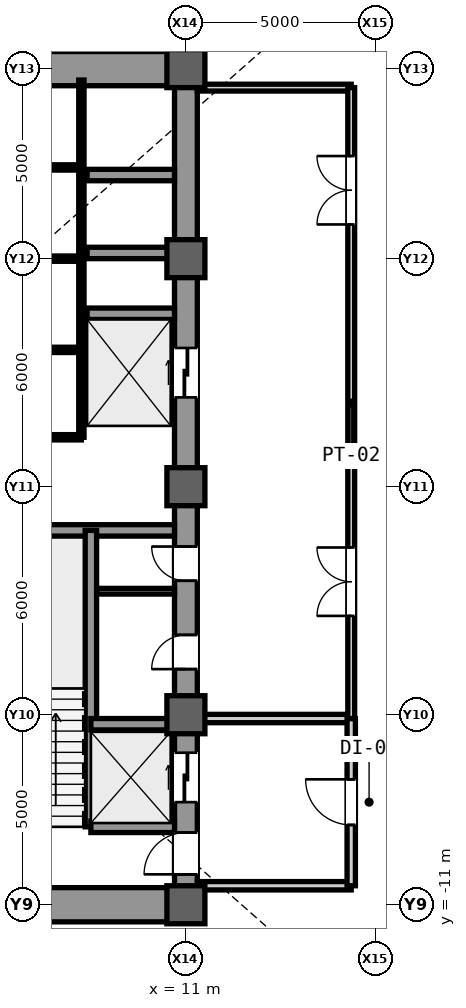
"""IFC4 building model, lengths in metres.
Left out: names, types, materials, properties, quantities, classifications, styles, units other than length and angle.
Written with IfcOpenShell. Run it as: python <this file> out.ifc"""

import sys

from ifc_helpers import new_model, si_unit, direction, frame, frame_2d, origin, origin_2d, place, context, subcontext, project, spatial, rectangle, extrude, source, transform, mapped, element, fill, save


model = new_model("IFC4")
c1 = context("Model", 3, precision=1e-05, world=origin(), true_north=direction((0.0, 1.0)))
c2 = subcontext(c1, "Body", "Model", "MODEL_VIEW")
j1 = project(units=[si_unit("LENGTHUNIT", "METRE"), si_unit("PLANEANGLEUNIT", "RADIAN")], contexts=[c1])
p1 = place(None, origin())
s1 = spatial("IfcSite", under=j1, at=p1, CompositionType="ELEMENT")
p2 = place(p1, origin())
s2 = spatial("IfcBuilding", under=s1, at=p2, CompositionType="ELEMENT")
p3 = place(p2, frame((0.0, 0.0, -9.6)))
s3 = spatial("IfcBuildingStorey", under=s2, at=p3, CompositionType="ELEMENT", Elevation=-9.6)
m1 = source(origin(), c2, "Body", "SweptSolid", [
    extrude(rectangle(XDim=22.0, YDim=0.6, at=frame_2d((11.0, 0.0))), origin(), (0.0, 0.0, 1.0), 4.48),
])
p4 = place(p3, frame((11.0, -11.0, 0.0), z_axis=(0.0, 0.0, 1.0), x_axis=(0.0, 1.0, 0.0)))
e1 = element("IfcWall", 1, at=p4, inside=s3, PredefinedType="SHEAR", context=c2, shape_type="MappedRepresentation", body=[
    mapped(m1, transform((0.0, 0.0, 0.0), scale=1.0)),
])
m2 = source(origin(), c2, "Body", "SweptSolid", [
    extrude(rectangle(XDim=1.1, YDim=2.2, at=frame_2d((0.55, 1.1))), frame((0.0, 0.31, 0.0), z_axis=(0.0, -1.0, 0.0), x_axis=(1.0, 0.0, 0.0)), (0.0, 0.0, 1.0), 0.62),
])
p5 = place(p4, frame((0.8, 0.0, 0.0)))
e2 = element("IfcOpeningElement", 2, at=p5, cuts=e1, PredefinedType="OPENING", context=c2, shape_type="MappedRepresentation", body=[
    mapped(m2, transform((0.0, 0.0, 0.0), scale=1.0)),
])
m3 = source(origin(), c2, "Body", "SweptSolid", [
    extrude(rectangle(XDim=0.9, YDim=2.15, at=frame_2d((0.45, 1.075))), frame((0.0, 0.31, 0.0), z_axis=(0.0, -1.0, 0.0), x_axis=(1.0, 0.0, 0.0)), (0.0, 0.0, 1.0), 0.62),
])
p6 = place(p4, frame((6.2, 0.0, 0.0)))
e3 = element("IfcOpeningElement", 3, at=p6, cuts=e1, PredefinedType="OPENING", context=c2, shape_type="MappedRepresentation", body=[
    mapped(m3, transform((0.0, 0.0, 0.0), scale=1.0)),
])
p7 = place(p4, frame((8.525, 0.0, 0.0)))
e4 = element("IfcOpeningElement", 4, at=p7, cuts=e1, PredefinedType="OPENING", context=c2, shape_type="MappedRepresentation", body=[
    mapped(m3, transform((0.0, 0.0, 0.0), scale=1.0)),
])
m4 = source(origin(), c2, "Body", "SweptSolid", [
    extrude(rectangle(XDim=1.3, YDim=2.3, at=frame_2d((0.65, 1.15))), frame((0.0, 0.31, 0.0), z_axis=(0.0, -1.0, 0.0), x_axis=(1.0, 0.0, 0.0)), (0.0, 0.0, 1.0), 0.62),
])
p8 = place(p4, frame((2.7, 0.0, 0.0)))
e5 = element("IfcOpeningElement", 5, at=p8, cuts=e1, PredefinedType="OPENING", context=c2, shape_type="MappedRepresentation", body=[
    mapped(m4, transform((0.0, 0.0, 0.0), scale=1.0)),
])
p9 = place(p4, frame((13.35, 0.0, 0.0)))
e6 = element("IfcOpeningElement", 6, at=p9, cuts=e1, PredefinedType="OPENING", context=c2, shape_type="MappedRepresentation", body=[
    mapped(m4, transform((0.0, 0.0, 0.0), scale=1.0)),
])
m5 = source(origin(), c2, "Body", "SweptSolid", [
    extrude(rectangle(XDim=5.85, YDim=0.9, at=frame_2d((2.925, 0.0))), origin(), (0.0, 0.0, 1.0), 4.48),
])
p10 = place(p3, frame((4.85, -11.0, 0.0), z_axis=(0.0, 0.0, 1.0), x_axis=(1.0, 0.0, 0.0)))
e7 = element("IfcWall", 7, at=p10, inside=s3, PredefinedType="SHEAR", context=c2, shape_type="MappedRepresentation", body=[
    mapped(m5, transform((0.0, 0.0, 0.0), scale=1.0)),
])
p11 = place(p3, frame((4.85, 11.0, 0.0), z_axis=(0.0, 0.0, 1.0), x_axis=(1.0, 0.0, 0.0)))
e8 = element("IfcWall", 8, at=p11, inside=s3, PredefinedType="SHEAR", context=c2, shape_type="MappedRepresentation", body=[
    mapped(m5, transform((0.0, 0.0, 0.0), scale=1.0)),
])
m6 = source(origin(), c2, "Body", "SweptSolid", [
    extrude(rectangle(XDim=1.05, YDim=2.2, at=frame_2d((0.525, 1.1))), frame((0.0, 0.46, 0.0), z_axis=(0.0, -1.0, 0.0), x_axis=(1.0, 0.0, 0.0)), (0.0, 0.0, 1.0), 0.92),
])
p12 = place(p11, frame((1.375, 0.0, 0.0)))
e9 = element("IfcOpeningElement", 9, at=p12, cuts=e8, PredefinedType="OPENING", context=c2, shape_type="MappedRepresentation", body=[
    mapped(m6, transform((0.0, 0.0, 0.0), scale=1.0)),
])
m7 = source(origin(), c2, "Body", "SweptSolid", [
    extrude(rectangle(XDim=5.6, YDim=0.3, at=frame_2d((2.8, 0.0))), origin(), (0.0, 0.0, 1.0), 4.48),
])
p13 = place(p3, frame((5.1, -1.15, 0.0), z_axis=(0.0, 0.0, 1.0), x_axis=(1.0, 0.0, 0.0)))
e10 = element("IfcWall", 10, at=p13, inside=s3, PredefinedType="SHEAR", context=c2, shape_type="MappedRepresentation", body=[
    mapped(m7, transform((0.0, 0.0, 0.0), scale=1.0)),
])
m8 = source(origin(), c2, "Body", "SweptSolid", [
    extrude(rectangle(XDim=1.0, YDim=1.0, at=origin_2d()), origin(), (0.0, 0.0, 1.0), 4.8),
])
for number, where, z_axis, x_axis in (
    (11, (11.0, -11.0, 0.0), (0.0, 0.0, 1.0), (1.0, 0.0, 0.0)),
    (12, (11.0, -6.0, 0.0), (0.0, 0.0, 1.0), (1.0, 0.0, 0.0)),
    (13, (11.0, 0.0, 0.0), (0.0, 0.0, 1.0), (1.0, 0.0, 0.0)),
    (14, (11.0, 6.0, 0.0), (0.0, 0.0, 1.0), (1.0, 0.0, 0.0)),
    (15, (11.0, 11.0, 0.0), (0.0, 0.0, 1.0), (1.0, 0.0, 0.0)),
):
    element("IfcColumn", number, at=place(p3, frame(where, z_axis=z_axis, x_axis=x_axis)), inside=s3, PredefinedType="COLUMN", context=c2, shape_type="MappedRepresentation", body=[
        mapped(m8, transform((0.0, 0.0, 0.0), scale=1.0)),
    ])
m9 = source(origin(), c2, "Body", "SweptSolid", [
    extrude(rectangle(XDim=7.8, YDim=0.3, at=frame_2d((3.9, 0.0))), origin(), (0.0, 0.0, 1.0), 4.48),
])
p14 = place(p3, frame((8.5, -8.95, 0.0), z_axis=(0.0, 0.0, 1.0), x_axis=(0.0, 1.0, 0.0)))
e16 = element("IfcWall", 16, at=p14, inside=s3, PredefinedType="SHEAR", context=c2, shape_type="MappedRepresentation", body=[
    mapped(m9, transform((0.0, 0.0, 0.0), scale=1.0)),
])
m10 = source(origin(), c2, "Body", "SweptSolid", [
    extrude(rectangle(XDim=2.2, YDim=0.3, at=frame_2d((1.1, 0.0))), origin(), (0.0, 0.0, 1.0), 4.48),
])
for number, where, z_axis, x_axis in (
    (17, (8.5, -8.95, 0.0), (0.0, 0.0, 1.0), (1.0, 0.0, 0.0)),
    (18, (8.5, -6.25, 0.0), (0.0, 0.0, 1.0), (1.0, 0.0, 0.0)),
):
    element("IfcWall", number, at=place(p3, frame(where, z_axis=z_axis, x_axis=x_axis)), inside=s3, PredefinedType="SHEAR", context=c2, shape_type="MappedRepresentation", body=[
        mapped(m10, transform((0.0, 0.0, 0.0), scale=1.0)),
    ])
m11 = source(origin(), c2, "Body", "SweptSolid", [
    extrude(rectangle(XDim=2.3, YDim=0.3, at=frame_2d((1.15, 0.0))), origin(), (0.0, 0.0, 1.0), 4.48),
])
for number, where, z_axis, x_axis in (
    (19, (8.4, 4.55, 0.0), (0.0, 0.0, 1.0), (1.0, 0.0, 0.0)),
    (20, (8.4, 6.15, 0.0), (0.0, 0.0, 1.0), (1.0, 0.0, 0.0)),
    (21, (8.4, 8.2, 0.0), (0.0, 0.0, 1.0), (1.0, 0.0, 0.0)),
):
    element("IfcWall", number, at=place(p3, frame(where, z_axis=z_axis, x_axis=x_axis)), inside=s3, PredefinedType="SHEAR", context=c2, shape_type="MappedRepresentation", body=[
        mapped(m11, transform((0.0, 0.0, 0.0), scale=1.0)),
    ])
m12 = source(origin(), c2, "Body", "SweptSolid", [
    extrude(rectangle(XDim=2.05, YDim=0.15, at=frame_2d((1.025, 0.0))), origin(), (0.0, 0.0, 1.0), 4.48),
])
p15 = place(p3, frame((8.65, -2.75, 0.0), z_axis=(0.0, 0.0, 1.0), x_axis=(1.0, 0.0, 0.0)))
e22 = element("IfcWall", 22, at=p15, inside=s3, PredefinedType="PARTITIONING", context=c2, shape_type="MappedRepresentation", body=[
    mapped(m12, transform((0.0, 0.0, 0.0), scale=1.0)),
])
m13 = source(origin(), c2, "Body", "SweptSolid", [
    extrude(rectangle(XDim=9.4, YDim=0.14, at=frame_2d((4.7, 0.0))), origin(), (0.0, 0.0, 1.0), 4.48),
])
p16 = place(p3, frame((8.25, 1.3, 0.0), z_axis=(0.0, 0.0, 1.0), x_axis=(0.0, 1.0, 0.0)))
e23 = element("IfcWall", 23, at=p16, inside=s3, PredefinedType="PARTITIONING", context=c2, shape_type="MappedRepresentation", body=[
    mapped(m13, transform((0.0, 0.0, 0.0), scale=1.0)),
])
m14 = source(origin(), c2, "Body", "SweptSolid", [
    extrude(rectangle(XDim=3.15, YDim=0.14, at=frame_2d((1.575, 0.0))), origin(), (0.0, 0.0, 1.0), 4.48),
])
p17 = place(p3, frame((5.1, 1.3, 0.0), z_axis=(0.0, 0.0, 1.0), x_axis=(1.0, 0.0, 0.0)))
e24 = element("IfcWall", 24, at=p17, inside=s3, PredefinedType="PARTITIONING", context=c2, shape_type="MappedRepresentation", body=[
    mapped(m14, transform((0.0, 0.0, 0.0), scale=1.0)),
])
p18 = place(p3, frame((5.1, 8.4, 0.0), z_axis=(0.0, 0.0, 1.0), x_axis=(1.0, 0.0, 0.0)))
e25 = element("IfcWall", 25, at=p18, inside=s3, PredefinedType="PARTITIONING", context=c2, shape_type="MappedRepresentation", body=[
    mapped(m14, transform((0.0, 0.0, 0.0), scale=1.0)),
])
m15 = source(origin(), c2, "Body", "SweptSolid", [
    extrude(rectangle(XDim=0.9, YDim=2.15, at=frame_2d((0.45, 1.075))), frame((0.0, 0.08, 0.0), z_axis=(0.0, -1.0, 0.0), x_axis=(1.0, 0.0, 0.0)), (0.0, 0.0, 1.0), 0.16),
])
p19 = place(p18, frame((1.13, 0.0, 0.0)))
e26 = element("IfcOpeningElement", 26, at=p19, cuts=e25, PredefinedType="OPENING", context=c2, shape_type="MappedRepresentation", body=[
    mapped(m15, transform((0.0, 0.0, 0.0), scale=1.0)),
])
p20 = place(p3, frame((5.1, 6.0, 0.0), z_axis=(0.0, 0.0, 1.0), x_axis=(1.0, 0.0, 0.0)))
e27 = element("IfcWall", 27, at=p20, inside=s3, PredefinedType="PARTITIONING", context=c2, shape_type="MappedRepresentation", body=[
    mapped(m14, transform((0.0, 0.0, 0.0), scale=1.0)),
])
p21 = place(p20, frame((1.13, 0.0, 0.0)))
e28 = element("IfcOpeningElement", 28, at=p21, cuts=e27, PredefinedType="OPENING", context=c2, shape_type="MappedRepresentation", body=[
    mapped(m15, transform((0.0, 0.0, 0.0), scale=1.0)),
])
p22 = place(p3, frame((5.1, 3.6, 0.0), z_axis=(0.0, 0.0, 1.0), x_axis=(1.0, 0.0, 0.0)))
e29 = element("IfcWall", 29, at=p22, inside=s3, PredefinedType="PARTITIONING", context=c2, shape_type="MappedRepresentation", body=[
    mapped(m14, transform((0.0, 0.0, 0.0), scale=1.0)),
])
p23 = place(p22, frame((1.13, 0.0, 0.0)))
e30 = element("IfcOpeningElement", 30, at=p23, cuts=e29, PredefinedType="OPENING", context=c2, shape_type="MappedRepresentation", body=[
    mapped(m15, transform((0.0, 0.0, 0.0), scale=1.0)),
])
m16 = source(origin(), c2, "Body", "SweptSolid", [
    extrude(rectangle(XDim=4.05, YDim=0.22, at=frame_2d((2.025, 0.0))), origin(), (0.0, 0.0, 1.0), 4.48),
])
for number, where, z_axis, x_axis in (
    (31, (11.3, -10.5, 0.0), (0.0, 0.0, 1.0), (1.0, 0.0, 0.0)),
    (32, (11.3, -6.1, 0.0), (0.0, 0.0, 1.0), (1.0, 0.0, 0.0)),
):
    element("IfcWall", number, at=place(p3, frame(where, z_axis=z_axis, x_axis=x_axis)), inside=s3, PredefinedType="PARTITIONING", context=c2, shape_type="MappedRepresentation", body=[
        mapped(m16, transform((0.0, 0.0, 0.0), scale=1.0)),
    ])
m17 = source(origin(), c2, "Body", "SweptSolid", [
    extrude(rectangle(XDim=4.4, YDim=0.22, at=frame_2d((2.2, 0.0))), origin(), (0.0, 0.0, 1.0), 4.48),
])
p24 = place(p3, frame((15.35, -10.5, 0.0), z_axis=(0.0, 0.0, 1.0), x_axis=(0.0, 1.0, 0.0)))
e33 = element("IfcWall", 33, at=p24, inside=s3, PredefinedType="PARTITIONING", context=c2, shape_type="MappedRepresentation", body=[
    mapped(m17, transform((0.0, 0.0, 0.0), scale=1.0)),
])
m18 = source(origin(), c2, "Body", "SweptSolid", [
    extrude(rectangle(XDim=1.2, YDim=2.2, at=frame_2d((0.6, 1.1))), frame((0.0, 0.12, 0.0), z_axis=(0.0, -1.0, 0.0), x_axis=(1.0, 0.0, 0.0)), (0.0, 0.0, 1.0), 0.24),
])
p25 = place(p24, frame((1.6, 0.0, 0.0)))
e34 = element("IfcOpeningElement", 34, at=p25, cuts=e33, PredefinedType="OPENING", context=c2, shape_type="MappedRepresentation", body=[
    mapped(m18, transform((0.0, 0.0, 0.0), scale=1.0)),
])
m19 = source(origin(), c2, "Body", "SweptSolid", [
    extrude(rectangle(XDim=4.05, YDim=0.18, at=frame_2d((2.025, 0.0))), origin(), (0.0, 0.0, 1.0), 4.48),
])
p26 = place(p3, frame((11.3, 10.5, 0.0), z_axis=(0.0, 0.0, 1.0), x_axis=(1.0, 0.0, 0.0)))
e35 = element("IfcWall", 35, at=p26, inside=s3, PredefinedType="PARTITIONING", context=c2, shape_type="MappedRepresentation", body=[
    mapped(m19, transform((0.0, 0.0, 0.0), scale=1.0)),
])
m20 = source(origin(), c2, "Body", "SweptSolid", [
    extrude(rectangle(XDim=16.6, YDim=0.18, at=frame_2d((8.3, 0.0))), origin(), (0.0, 0.0, 1.0), 4.48),
])
p27 = place(p3, frame((15.35, -6.1, 0.0), z_axis=(0.0, 0.0, 1.0), x_axis=(0.0, 1.0, 0.0)))
e36 = element("IfcWall", 36, at=p27, inside=s3, PredefinedType="PARTITIONING", context=c2, shape_type="MappedRepresentation", body=[
    mapped(m20, transform((0.0, 0.0, 0.0), scale=1.0)),
])
m21 = source(origin(), c2, "Body", "SweptSolid", [
    extrude(rectangle(XDim=1.8, YDim=2.25, at=frame_2d((0.9, 1.125))), frame((0.0, 0.1, 0.0), z_axis=(0.0, -1.0, 0.0), x_axis=(1.0, 0.0, 0.0)), (0.0, 0.0, 1.0), 0.2),
])
p28 = place(p27, frame((2.7, 0.0, 0.0)))
e37 = element("IfcOpeningElement", 37, at=p28, cuts=e36, PredefinedType="OPENING", context=c2, shape_type="MappedRepresentation", body=[
    mapped(m21, transform((0.0, 0.0, 0.0), scale=1.0)),
])
p29 = place(p27, frame((13.0, 0.0, 0.0)))
e38 = element("IfcOpeningElement", 38, at=p29, cuts=e36, PredefinedType="OPENING", context=c2, shape_type="MappedRepresentation", body=[
    mapped(m21, transform((0.0, 0.0, 0.0), scale=1.0)),
])
m22 = source(origin(), c2, "Body", "SweptSolid", [
    extrude(rectangle(XDim=1.1, YDim=2.2, at=frame_2d((0.55, 1.1))), frame((0.0, 0.025, 0.0), z_axis=(0.0, -1.0, 0.0), x_axis=(1.0, 0.0, 0.0)), (0.0, 0.0, 1.0), 0.05),
])
p30 = place(p5, origin())
e39 = element("IfcDoor", 39, at=p30, inside=s3, OperationType="SINGLE_SWING_LEFT", PredefinedType="DOOR", context=c2, shape_type="MappedRepresentation", body=[
    mapped(m22, transform((0.0, 0.0, 0.0), scale=1.0)),
])
fill(e2, e39)
m23 = source(origin(), c2, "Body", "SweptSolid", [
    extrude(rectangle(XDim=0.9, YDim=2.15, at=frame_2d((0.45, 1.075))), frame((0.0, 0.025, 0.0), z_axis=(0.0, -1.0, 0.0), x_axis=(1.0, 0.0, 0.0)), (0.0, 0.0, 1.0), 0.05),
])
p31 = place(p6, origin())
e40 = element("IfcDoor", 40, at=p31, inside=s3, OperationType="SINGLE_SWING_LEFT", PredefinedType="DOOR", context=c2, shape_type="MappedRepresentation", body=[
    mapped(m23, transform((0.0, 0.0, 0.0), scale=1.0)),
])
fill(e3, e40)
p32 = place(p7, origin())
e41 = element("IfcDoor", 41, at=p32, inside=s3, OperationType="SINGLE_SWING_RIGHT", PredefinedType="DOOR", context=c2, shape_type="MappedRepresentation", body=[
    mapped(m23, transform((0.0, 0.0, 0.0), scale=1.0)),
])
fill(e4, e41)
m24 = source(origin(), c2, "Body", "SweptSolid", [
    extrude(rectangle(XDim=1.2, YDim=2.2, at=frame_2d((0.6, 1.1))), frame((0.0, 0.025, 0.0), z_axis=(0.0, -1.0, 0.0), x_axis=(1.0, 0.0, 0.0)), (0.0, 0.0, 1.0), 0.05),
])
p33 = place(p25, origin())
e42 = element("IfcDoor", 42, at=p33, inside=s3, OperationType="SINGLE_SWING_RIGHT", PredefinedType="DOOR", context=c2, shape_type="MappedRepresentation", body=[
    mapped(m24, transform((0.0, 0.0, 0.0), scale=1.0)),
])
fill(e34, e42)
m25 = source(origin(), c2, "Body", "SweptSolid", [
    extrude(rectangle(XDim=1.8, YDim=2.25, at=frame_2d((0.9, 1.125))), frame((0.0, 0.025, 0.0), z_axis=(0.0, -1.0, 0.0), x_axis=(1.0, 0.0, 0.0)), (0.0, 0.0, 1.0), 0.05),
])
p34 = place(p28, origin())
e43 = element("IfcDoor", 43, at=p34, inside=s3, OperationType="SINGLE_SWING_RIGHT", PredefinedType="DOOR", context=c2, shape_type="MappedRepresentation", body=[
    mapped(m25, transform((0.0, 0.0, 0.0), scale=1.0)),
])
fill(e37, e43)
p35 = place(p29, origin())
e44 = element("IfcDoor", 44, at=p35, inside=s3, OperationType="SINGLE_SWING_LEFT", PredefinedType="DOOR", context=c2, shape_type="MappedRepresentation", body=[
    mapped(m25, transform((0.0, 0.0, 0.0), scale=1.0)),
])
fill(e38, e44)
m26 = source(origin(), c2, "Body", "SweptSolid", [
    extrude(rectangle(XDim=1.3, YDim=2.3, at=frame_2d((0.65, 1.15))), frame((0.0, 0.025, 0.0), z_axis=(0.0, -1.0, 0.0), x_axis=(1.0, 0.0, 0.0)), (0.0, 0.0, 1.0), 0.05),
])
p36 = place(p8, origin())
e45 = element("IfcDoor", 45, at=p36, inside=s3, OperationType="SLIDING_TO_LEFT", PredefinedType="DOOR", context=c2, shape_type="MappedRepresentation", body=[
    mapped(m26, transform((0.0, 0.0, 0.0), scale=1.0)),
])
fill(e5, e45)
p37 = place(p9, origin())
e46 = element("IfcDoor", 46, at=p37, inside=s3, OperationType="SLIDING_TO_LEFT", PredefinedType="DOOR", context=c2, shape_type="MappedRepresentation", body=[
    mapped(m26, transform((0.0, 0.0, 0.0), scale=1.0)),
])
fill(e6, e46)
save(model, sys.argv[1])
